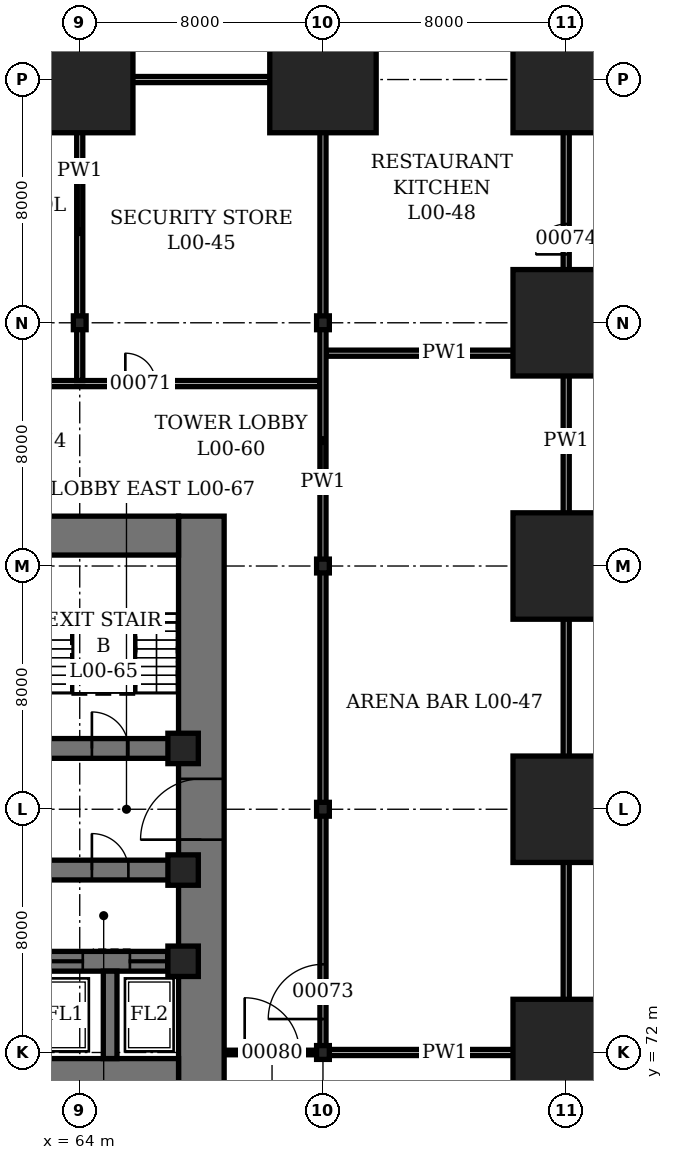
"""IFC4 building model, lengths in metres.
Left out: names, types, materials, properties, quantities, classifications, styles, units other than length and angle.
Written with IfcOpenShell. Run it as: python <this file> out.ifc"""

import sys

from ifc_helpers import new_model, si_unit, direction, frame, frame_2d, origin, origin_2d, place, context, subcontext, project, spatial, rectangle, hollow_rectangle, i_section, extrude, element, fill, save


model = new_model("IFC4")
c1 = context("Model", 3, precision=1e-05, world=origin(), true_north=direction((0.0, 1.0)))
c2 = subcontext(c1, "Body", "Model", "MODEL_VIEW")
j1 = project(units=[si_unit("LENGTHUNIT", "METRE"), si_unit("PLANEANGLEUNIT", "RADIAN")], contexts=[c1])
p1 = place(None, origin())
s1 = spatial("IfcSite", under=j1, at=p1, CompositionType="ELEMENT")
p2 = place(p1, origin())
s2 = spatial("IfcBuilding", under=s1, at=p2, CompositionType="ELEMENT")
p3 = place(p2, origin())
s3 = spatial("IfcBuildingStorey", under=s2, at=p3, CompositionType="ELEMENT", Elevation=0.0)
p4 = place(p3, frame((64.0, 96.0, 0.0), z_axis=(0.0, 0.0, 1.0), x_axis=(1.0, 0.0, 0.0)))
e1 = element("IfcColumn", 1, at=p4, inside=s3, PredefinedType="COLUMN", context=c2, shape_type="SweptSolid", body=[
    extrude(i_section(OverallWidth=0.419, OverallDepth=0.455, WebThickness=0.042, FlangeThickness=0.068, at=origin_2d()), origin(), (0.0, 0.0, 1.0), 4.9),
])
p5 = place(p3, frame((64.0, 104.0, 0.0), z_axis=(0.0, 0.0, 1.0), x_axis=(1.0, 0.0, 0.0)))
e2 = element("IfcColumn", 2, at=p5, inside=s3, PredefinedType="COLUMN", context=c2, shape_type="SweptSolid", body=[
    extrude(hollow_rectangle(XDim=3.5, YDim=3.5, WallThickness=0.5, at=origin_2d()), origin(), (0.0, 0.0, 1.0), 4.9),
])
for number, where, z_axis, x_axis in (
    (3, (72.0, 72.0, 0.0), (0.0, 0.0, 1.0), (1.0, 0.0, 0.0)),
    (4, (72.0, 80.0, 0.0), (0.0, 0.0, 1.0), (1.0, 0.0, 0.0)),
    (5, (72.0, 88.0, 0.0), (0.0, 0.0, 1.0), (1.0, 0.0, 0.0)),
    (6, (72.0, 96.0, 0.0), (0.0, 0.0, 1.0), (1.0, 0.0, 0.0)),
):
    element("IfcColumn", number, at=place(p3, frame(where, z_axis=z_axis, x_axis=x_axis)), inside=s3, PredefinedType="COLUMN", context=c2, shape_type="SweptSolid", body=[
        extrude(i_section(OverallWidth=0.419, OverallDepth=0.455, WebThickness=0.042, FlangeThickness=0.068, at=origin_2d()), origin(), (0.0, 0.0, 1.0), 4.9),
    ])
for number, where, z_axis, x_axis in (
    (7, (72.0, 104.0, 0.0), (0.0, 0.0, 1.0), (1.0, 0.0, 0.0)),
    (8, (80.0, 72.0, 0.0), (0.0, 0.0, 1.0), (1.0, 0.0, 0.0)),
    (9, (80.0, 80.0, 0.0), (0.0, 0.0, 1.0), (1.0, 0.0, 0.0)),
    (10, (80.0, 88.0, 0.0), (0.0, 0.0, 1.0), (1.0, 0.0, 0.0)),
    (11, (80.0, 96.0, 0.0), (0.0, 0.0, 1.0), (1.0, 0.0, 0.0)),
    (12, (80.0, 104.0, 0.0), (0.0, 0.0, 1.0), (1.0, 0.0, 0.0)),
):
    element("IfcColumn", number, at=place(p3, frame(where, z_axis=z_axis, x_axis=x_axis)), inside=s3, PredefinedType="COLUMN", context=c2, shape_type="SweptSolid", body=[
        extrude(hollow_rectangle(XDim=3.5, YDim=3.5, WallThickness=0.5, at=origin_2d()), origin(), (0.0, 0.0, 1.0), 4.9),
    ])
p6 = place(p3, frame((68.0, 70.2, -2.0), z_axis=(0.0, 0.0, 1.0), x_axis=(0.0, 1.0, 0.0)))
e13 = element("IfcWall", 13, at=p6, inside=s3, PredefinedType="SHEAR", context=c2, shape_type="SweptSolid", body=[
    extrude(rectangle(XDim=19.44, YDim=1.5, at=frame_2d((9.72, 0.0))), origin(), (0.0, 0.0, 1.0), 6.9),
])
p7 = place(p6, frame((8.8, 0.0, 2.0)))
e14 = element("IfcOpeningElement", 14, at=p7, cuts=e13, PredefinedType="OPENING", context=c2, shape_type="SweptSolid", body=[
    extrude(rectangle(XDim=2.0, YDim=2.4, at=frame_2d((1.0, 1.2))), frame((0.0, 0.76, 0.0), z_axis=(0.0, -1.0, 0.0), x_axis=(1.0, 0.0, 0.0)), (0.0, 0.0, 1.0), 1.52),
])
p8 = place(p3, frame((44.64, 71.0, -2.0), z_axis=(0.0, 0.0, 1.0), x_axis=(1.0, 0.0, 0.0)))
e15 = element("IfcWall", 15, at=p8, inside=s3, PredefinedType="SHEAR", context=c2, shape_type="SweptSolid", body=[
    extrude(rectangle(XDim=22.61, YDim=1.6, at=frame_2d((11.305, 0.0))), origin(), (0.0, 0.0, 1.0), 6.9),
])
p9 = place(p8, frame((6.31, 0.0, 2.0)))
e16 = element("IfcOpeningElement", 16, at=p9, cuts=e15, PredefinedType="OPENING", context=c2, shape_type="SweptSolid", body=[
    extrude(rectangle(XDim=1.1, YDim=2.2, at=frame_2d((0.55, 1.1))), frame((0.0, 0.81, 0.0), z_axis=(0.0, -1.0, 0.0), x_axis=(1.0, 0.0, 0.0)), (0.0, 0.0, 1.0), 1.62),
])
p10 = place(p8, frame((9.31, 0.0, 2.0)))
e17 = element("IfcOpeningElement", 17, at=p10, cuts=e15, PredefinedType="OPENING", context=c2, shape_type="SweptSolid", body=[
    extrude(rectangle(XDim=1.1, YDim=2.2, at=frame_2d((0.55, 1.1))), frame((0.0, 0.81, 0.0), z_axis=(0.0, -1.0, 0.0), x_axis=(1.0, 0.0, 0.0)), (0.0, 0.0, 1.0), 1.62),
])
p11 = place(p8, frame((12.31, 0.0, 2.0)))
e18 = element("IfcOpeningElement", 18, at=p11, cuts=e15, PredefinedType="OPENING", context=c2, shape_type="SweptSolid", body=[
    extrude(rectangle(XDim=1.1, YDim=2.2, at=frame_2d((0.55, 1.1))), frame((0.0, 0.81, 0.0), z_axis=(0.0, -1.0, 0.0), x_axis=(1.0, 0.0, 0.0)), (0.0, 0.0, 1.0), 1.62),
])
p12 = place(p8, frame((15.31, 0.0, 2.0)))
e19 = element("IfcOpeningElement", 19, at=p12, cuts=e15, PredefinedType="OPENING", context=c2, shape_type="SweptSolid", body=[
    extrude(rectangle(XDim=1.1, YDim=2.2, at=frame_2d((0.55, 1.1))), frame((0.0, 0.81, 0.0), z_axis=(0.0, -1.0, 0.0), x_axis=(1.0, 0.0, 0.0)), (0.0, 0.0, 1.0), 1.62),
])
p13 = place(p3, frame((44.64, 89.0, -2.0), z_axis=(0.0, 0.0, 1.0), x_axis=(1.0, 0.0, 0.0)))
e20 = element("IfcWall", 20, at=p13, inside=s3, PredefinedType="SHEAR", context=c2, shape_type="SweptSolid", body=[
    extrude(rectangle(XDim=22.61, YDim=1.28, at=frame_2d((11.305, 0.0))), origin(), (0.0, 0.0, 1.0), 6.9),
])
p14 = place(p13, frame((7.86, 0.0, 2.0)))
e21 = element("IfcOpeningElement", 21, at=p14, cuts=e20, PredefinedType="OPENING", context=c2, shape_type="SweptSolid", body=[
    extrude(rectangle(XDim=1.0, YDim=2.1, at=frame_2d((0.5, 1.05))), frame((0.0, 0.65, 0.0), z_axis=(0.0, -1.0, 0.0), x_axis=(1.0, 0.0, 0.0)), (0.0, 0.0, 1.0), 1.3),
])
p15 = place(p13, frame((13.91, 0.0, 2.0)))
e22 = element("IfcOpeningElement", 22, at=p15, cuts=e20, PredefinedType="OPENING", context=c2, shape_type="SweptSolid", body=[
    extrude(rectangle(XDim=0.9, YDim=2.1, at=frame_2d((0.45, 1.05))), frame((0.0, 0.65, 0.0), z_axis=(0.0, -1.0, 0.0), x_axis=(1.0, 0.0, 0.0)), (0.0, 0.0, 1.0), 1.3),
])
p16 = place(p3, frame((62.325, 75.0, -2.0), z_axis=(0.0, 0.0, 1.0), x_axis=(1.0, 0.0, 0.0)))
e23 = element("IfcWall", 23, at=p16, inside=s3, PredefinedType="SHEAR", context=c2, shape_type="SweptSolid", body=[
    extrude(rectangle(XDim=4.925, YDim=0.65, at=frame_2d((2.462, 0.0))), origin(), (0.0, 0.0, 1.0), 6.9),
])
p17 = place(p16, frame((0.575, 0.0, 2.0)))
e24 = element("IfcOpeningElement", 24, at=p17, cuts=e23, PredefinedType="OPENING", context=c2, shape_type="SweptSolid", body=[
    extrude(rectangle(XDim=1.2, YDim=2.2, at=frame_2d((0.6, 1.1))), frame((0.0, 0.335, 0.0), z_axis=(0.0, -1.0, 0.0), x_axis=(1.0, 0.0, 0.0)), (0.0, 0.0, 1.0), 0.67),
])
p18 = place(p16, frame((3.325, 0.0, 2.0)))
e25 = element("IfcOpeningElement", 25, at=p18, cuts=e23, PredefinedType="OPENING", context=c2, shape_type="SweptSolid", body=[
    extrude(rectangle(XDim=1.2, YDim=2.2, at=frame_2d((0.6, 1.1))), frame((0.0, 0.335, 0.0), z_axis=(0.0, -1.0, 0.0), x_axis=(1.0, 0.0, 0.0)), (0.0, 0.0, 1.0), 0.67),
])
p19 = place(p3, frame((62.325, 78.0, -2.0), z_axis=(0.0, 0.0, 1.0), x_axis=(1.0, 0.0, 0.0)))
e26 = element("IfcWall", 26, at=p19, inside=s3, PredefinedType="SHEAR", context=c2, shape_type="SweptSolid", body=[
    extrude(rectangle(XDim=4.925, YDim=0.65, at=frame_2d((2.462, 0.0))), origin(), (0.0, 0.0, 1.0), 6.9),
])
p20 = place(p19, frame((2.075, 0.0, 2.0)))
e27 = element("IfcOpeningElement", 27, at=p20, cuts=e26, PredefinedType="OPENING", context=c2, shape_type="SweptSolid", body=[
    extrude(rectangle(XDim=1.2, YDim=2.1, at=frame_2d((0.6, 1.05))), frame((0.0, 0.335, 0.0), z_axis=(0.0, -1.0, 0.0), x_axis=(1.0, 0.0, 0.0)), (0.0, 0.0, 1.0), 0.67),
])
p21 = place(p3, frame((62.325, 82.0, -2.0), z_axis=(0.0, 0.0, 1.0), x_axis=(1.0, 0.0, 0.0)))
e28 = element("IfcWall", 28, at=p21, inside=s3, PredefinedType="SHEAR", context=c2, shape_type="SweptSolid", body=[
    extrude(rectangle(XDim=4.925, YDim=0.65, at=frame_2d((2.462, 0.0))), origin(), (0.0, 0.0, 1.0), 6.9),
])
p22 = place(p21, frame((2.075, 0.0, 2.0)))
e29 = element("IfcOpeningElement", 29, at=p22, cuts=e28, PredefinedType="OPENING", context=c2, shape_type="SweptSolid", body=[
    extrude(rectangle(XDim=1.2, YDim=2.1, at=frame_2d((0.6, 1.05))), frame((0.0, 0.335, 0.0), z_axis=(0.0, -1.0, 0.0), x_axis=(1.0, 0.0, 0.0)), (0.0, 0.0, 1.0), 0.67),
])
p23 = place(p3, frame((65.0, 71.8, -2.0), z_axis=(0.0, 0.0, 1.0), x_axis=(0.0, 1.0, 0.0)))
e30 = element("IfcWall", 30, at=p23, inside=s3, PredefinedType="SHEAR", context=c2, shape_type="SweptSolid", body=[
    extrude(rectangle(XDim=2.875, YDim=0.45, at=frame_2d((1.438, 0.0))), origin(), (0.0, 0.0, 1.0), 6.9),
])
for number, where, z_axis, x_axis in (
    (31, (67.4, 75.0, -2.0), (0.0, 0.0, 1.0), (1.0, 0.0, 0.0)),
    (32, (67.4, 78.0, -2.0), (0.0, 0.0, 1.0), (1.0, 0.0, 0.0)),
    (33, (67.4, 82.0, -2.0), (0.0, 0.0, 1.0), (1.0, 0.0, 0.0)),
):
    element("IfcColumn", number, at=place(p3, frame(where, z_axis=z_axis, x_axis=x_axis)), inside=s3, PredefinedType="COLUMN", context=c2, shape_type="SweptSolid", body=[
        extrude(hollow_rectangle(XDim=1.0, YDim=1.0, WallThickness=0.15, at=origin_2d()), origin(), (0.0, 0.0, 1.0), 6.9),
    ])
p24 = place(p3, frame((72.1, 72.0, 0.0), z_axis=(0.0, 0.0, 1.0), x_axis=(1.0, 0.0, 0.0)))
e34 = element("IfcWall", 34, at=p24, inside=s3, PredefinedType="PARTITIONING", context=c2, shape_type="SweptSolid", body=[
    extrude(rectangle(XDim=7.8, YDim=0.2, at=frame_2d((3.9, 0.0))), origin(), (0.0, 0.0, 1.0), 3.928),
])
p25 = place(p3, frame((40.1, 94.0, 0.0), z_axis=(0.0, 0.0, 1.0), x_axis=(1.0, 0.0, 0.0)))
e35 = element("IfcWall", 35, at=p25, inside=s3, PredefinedType="PARTITIONING", context=c2, shape_type="SweptSolid", body=[
    extrude(rectangle(XDim=31.8, YDim=0.2, at=frame_2d((15.9, 0.0))), origin(), (0.0, 0.0, 1.0), 4.7),
])
p26 = place(p25, frame((1.0, 0.0, 0.0)))
e36 = element("IfcOpeningElement", 36, at=p26, cuts=e35, PredefinedType="OPENING", context=c2, shape_type="SweptSolid", body=[
    extrude(rectangle(XDim=1.8, YDim=2.4, at=frame_2d((0.9, 1.2))), frame((0.0, 0.11, 0.0), z_axis=(0.0, -1.0, 0.0), x_axis=(1.0, 0.0, 0.0)), (0.0, 0.0, 1.0), 0.22),
])
p27 = place(p25, frame((17.4, 0.0, 0.0)))
e37 = element("IfcOpeningElement", 37, at=p27, cuts=e35, PredefinedType="OPENING", context=c2, shape_type="SweptSolid", body=[
    extrude(rectangle(XDim=1.0, YDim=2.1, at=frame_2d((0.5, 1.05))), frame((0.0, 0.11, 0.0), z_axis=(0.0, -1.0, 0.0), x_axis=(1.0, 0.0, 0.0)), (0.0, 0.0, 1.0), 0.22),
])
p28 = place(p25, frame((25.4, 0.0, 0.0)))
e38 = element("IfcOpeningElement", 38, at=p28, cuts=e35, PredefinedType="OPENING", context=c2, shape_type="SweptSolid", body=[
    extrude(rectangle(XDim=1.0, YDim=2.1, at=frame_2d((0.5, 1.05))), frame((0.0, 0.11, 0.0), z_axis=(0.0, -1.0, 0.0), x_axis=(1.0, 0.0, 0.0)), (0.0, 0.0, 1.0), 0.22),
])
p29 = place(p3, frame((72.1, 95.0, 0.0), z_axis=(0.0, 0.0, 1.0), x_axis=(1.0, 0.0, 0.0)))
e39 = element("IfcWall", 39, at=p29, inside=s3, PredefinedType="PARTITIONING", context=c2, shape_type="SweptSolid", body=[
    extrude(rectangle(XDim=7.8, YDim=0.2, at=frame_2d((3.9, 0.0))), origin(), (0.0, 0.0, 1.0), 4.7),
])
p30 = place(p3, frame((24.1, 104.0, 0.0), z_axis=(0.0, 0.0, 1.0), x_axis=(1.0, 0.0, 0.0)))
e40 = element("IfcWall", 40, at=p30, inside=s3, PredefinedType="PARTITIONING", context=c2, shape_type="SweptSolid", body=[
    extrude(rectangle(XDim=47.8, YDim=0.2, at=frame_2d((23.9, 0.0))), origin(), (0.0, 0.0, 1.0), 3.928),
])
p31 = place(p30, frame((18.0, 0.0, 0.0)))
e41 = element("IfcOpeningElement", 41, at=p31, cuts=e40, PredefinedType="OPENING", context=c2, shape_type="SweptSolid", body=[
    extrude(rectangle(XDim=1.8, YDim=2.4, at=frame_2d((0.9, 1.2))), frame((0.0, 0.11, 0.0), z_axis=(0.0, -1.0, 0.0), x_axis=(1.0, 0.0, 0.0)), (0.0, 0.0, 1.0), 0.22),
])
p32 = place(p30, frame((34.15, 0.0, 0.0)))
e42 = element("IfcOpeningElement", 42, at=p32, cuts=e40, PredefinedType="OPENING", context=c2, shape_type="SweptSolid", body=[
    extrude(rectangle(XDim=1.0, YDim=2.1, at=frame_2d((0.5, 1.05))), frame((0.0, 0.11, 0.0), z_axis=(0.0, -1.0, 0.0), x_axis=(1.0, 0.0, 0.0)), (0.0, 0.0, 1.0), 0.22),
])
p33 = place(p3, frame((80.1, 104.0, 0.0), z_axis=(0.0, 0.0, 1.0), x_axis=(1.0, 0.0, 0.0)))
e43 = element("IfcWall", 43, at=p33, inside=s3, PredefinedType="PARTITIONING", context=c2, shape_type="SweptSolid", body=[
    extrude(rectangle(XDim=7.8, YDim=0.2, at=frame_2d((3.9, 0.0))), origin(), (0.0, 0.0, 1.0), 3.928),
])
p34 = place(p33, frame((3.4, 0.0, 0.0)))
e44 = element("IfcOpeningElement", 44, at=p34, cuts=e43, PredefinedType="OPENING", context=c2, shape_type="SweptSolid", body=[
    extrude(rectangle(XDim=1.0, YDim=2.1, at=frame_2d((0.5, 1.05))), frame((0.0, 0.11, 0.0), z_axis=(0.0, -1.0, 0.0), x_axis=(1.0, 0.0, 0.0)), (0.0, 0.0, 1.0), 0.22),
])
p35 = place(p3, frame((64.0, 94.1, 0.0), z_axis=(0.0, 0.0, 1.0), x_axis=(0.0, 1.0, 0.0)))
e45 = element("IfcWall", 45, at=p35, inside=s3, PredefinedType="PARTITIONING", context=c2, shape_type="SweptSolid", body=[
    extrude(rectangle(XDim=9.8, YDim=0.2, at=frame_2d((4.9, 0.0))), origin(), (0.0, 0.0, 1.0), 3.928),
])
p36 = place(p3, frame((72.0, 72.1, 0.0), z_axis=(0.0, 0.0, 1.0), x_axis=(0.0, 1.0, 0.0)))
e46 = element("IfcWall", 46, at=p36, inside=s3, PredefinedType="PARTITIONING", context=c2, shape_type="SweptSolid", body=[
    extrude(rectangle(XDim=40.05, YDim=0.2, at=frame_2d((20.025, 0.0))), origin(), (0.0, 0.0, 1.0), 3.928),
])
p37 = place(p36, frame((1.0, 0.0, 0.0)))
e47 = element("IfcOpeningElement", 47, at=p37, cuts=e46, PredefinedType="OPENING", context=c2, shape_type="SweptSolid", body=[
    extrude(rectangle(XDim=1.8, YDim=2.4, at=frame_2d((0.9, 1.2))), frame((0.0, 0.11, 0.0), z_axis=(0.0, -1.0, 0.0), x_axis=(1.0, 0.0, 0.0)), (0.0, 0.0, 1.0), 0.22),
])
p38 = place(p3, frame((80.0, 72.1, 0.0), z_axis=(0.0, 0.0, 1.0), x_axis=(0.0, 1.0, 0.0)))
e48 = element("IfcWall", 48, at=p38, inside=s3, PredefinedType="PARTITIONING", context=c2, shape_type="SweptSolid", body=[
    extrude(rectangle(XDim=40.05, YDim=0.2, at=frame_2d((20.025, 0.0))), origin(), (0.0, 0.0, 1.0), 3.928),
])
p39 = place(p38, frame((26.15, 0.0, 0.0)))
e49 = element("IfcOpeningElement", 49, at=p39, cuts=e48, PredefinedType="OPENING", context=c2, shape_type="SweptSolid", body=[
    extrude(rectangle(XDim=1.0, YDim=2.1, at=frame_2d((0.5, 1.05))), frame((0.0, 0.11, 0.0), z_axis=(0.0, -1.0, 0.0), x_axis=(1.0, 0.0, 0.0)), (0.0, 0.0, 1.0), 0.22),
])
p40 = place(p3, frame((68.75, 72.0, 0.0), z_axis=(0.0, 0.0, 1.0), x_axis=(1.0, 0.0, 0.0)))
e50 = element("IfcWall", 50, at=p40, inside=s3, PredefinedType="PARTITIONING", context=c2, shape_type="SweptSolid", body=[
    extrude(rectangle(XDim=3.15, YDim=0.15, at=frame_2d((1.575, 0.0))), origin(), (0.0, 0.0, 1.0), 4.7),
])
p41 = place(p40, frame((0.675, 0.0, 0.0)))
e51 = element("IfcOpeningElement", 51, at=p41, cuts=e50, PredefinedType="OPENING", context=c2, shape_type="SweptSolid", body=[
    extrude(rectangle(XDim=1.8, YDim=2.4, at=frame_2d((0.9, 1.2))), frame((0.0, 0.085, 0.0), z_axis=(0.0, -1.0, 0.0), x_axis=(1.0, 0.0, 0.0)), (0.0, 0.0, 1.0), 0.17),
])
p42 = place(p22, origin())
e52 = element("IfcDoor", 52, at=p42, inside=s3, OperationType="SINGLE_SWING_LEFT", PredefinedType="DOOR", context=c2, shape_type="SweptSolid", body=[
    extrude(rectangle(XDim=1.2, YDim=2.1, at=frame_2d((0.6, 1.05))), frame((0.0, 0.325, 0.0), z_axis=(0.0, -1.0, 0.0), x_axis=(1.0, 0.0, 0.0)), (0.0, 0.0, 1.0), 0.649),
])
fill(e29, e52)
p43 = place(p7, origin())
e53 = element("IfcDoor", 53, at=p43, inside=s3, OperationType="DOUBLE_DOOR_SINGLE_SWING", PredefinedType="DOOR", context=c2, shape_type="SweptSolid", body=[
    extrude(rectangle(XDim=2.0, YDim=2.4, at=frame_2d((1.0, 1.2))), frame((0.0, -0.05, 0.0), z_axis=(0.0, -1.0, 0.0), x_axis=(1.0, 0.0, 0.0)), (0.0, 0.0, 1.0), 0.7),
])
fill(e14, e53)
p44 = place(p20, origin())
e54 = element("IfcDoor", 54, at=p44, inside=s3, OperationType="SINGLE_SWING_RIGHT", PredefinedType="DOOR", context=c2, shape_type="SweptSolid", body=[
    extrude(rectangle(XDim=1.2, YDim=2.1, at=frame_2d((0.6, 1.05))), frame((0.0, 0.325, 0.0), z_axis=(0.0, -1.0, 0.0), x_axis=(1.0, 0.0, 0.0)), (0.0, 0.0, 1.0), 0.649),
])
fill(e27, e54)
p45 = place(p17, origin())
e55 = element("IfcDoor", 55, at=p45, inside=s3, OperationType="SLIDING_TO_LEFT", PredefinedType="DOOR", context=c2, shape_type="SweptSolid", body=[
    extrude(rectangle(XDim=1.2, YDim=2.2, at=frame_2d((0.6, 1.1))), frame((0.0, 0.325, 0.0), z_axis=(0.0, -1.0, 0.0), x_axis=(1.0, 0.0, 0.0)), (0.0, 0.0, 1.0), 0.649),
])
fill(e24, e55)
p46 = place(p18, origin())
e56 = element("IfcDoor", 56, at=p46, inside=s3, OperationType="SLIDING_TO_LEFT", PredefinedType="DOOR", context=c2, shape_type="SweptSolid", body=[
    extrude(rectangle(XDim=1.2, YDim=2.2, at=frame_2d((0.6, 1.1))), frame((0.0, 0.325, 0.0), z_axis=(0.0, -1.0, 0.0), x_axis=(1.0, 0.0, 0.0)), (0.0, 0.0, 1.0), 0.649),
])
fill(e25, e56)
p47 = place(p28, origin())
e57 = element("IfcDoor", 57, at=p47, inside=s3, OperationType="SINGLE_SWING_LEFT", PredefinedType="DOOR", context=c2, shape_type="SweptSolid", body=[
    extrude(rectangle(XDim=1.0, YDim=2.1, at=frame_2d((0.5, 1.05))), frame((0.0, 0.1, 0.0), z_axis=(0.0, -1.0, 0.0), x_axis=(1.0, 0.0, 0.0)), (0.0, 0.0, 1.0), 0.199),
])
fill(e38, e57)
p48 = place(p37, origin())
e58 = element("IfcDoor", 58, at=p48, inside=s3, OperationType="DOUBLE_DOOR_DOUBLE_SWING", PredefinedType="DOOR", context=c2, shape_type="SweptSolid", body=[
    extrude(rectangle(XDim=1.8, YDim=2.4, at=frame_2d((0.9, 1.2))), frame((0.0, 0.1, 0.0), z_axis=(0.0, -1.0, 0.0), x_axis=(1.0, 0.0, 0.0)), (0.0, 0.0, 1.0), 0.199),
])
fill(e47, e58)
p49 = place(p39, origin())
e59 = element("IfcDoor", 59, at=p49, inside=s3, OperationType="SINGLE_SWING_LEFT", PredefinedType="DOOR", context=c2, shape_type="SweptSolid", body=[
    extrude(rectangle(XDim=1.0, YDim=2.1, at=frame_2d((0.5, 1.05))), frame((0.0, 0.1, 0.0), z_axis=(0.0, -1.0, 0.0), x_axis=(1.0, 0.0, 0.0)), (0.0, 0.0, 1.0), 0.199),
])
fill(e49, e59)
p50 = place(p41, origin())
e60 = element("IfcDoor", 60, at=p50, inside=s3, OperationType="DOUBLE_DOOR_DOUBLE_SWING", PredefinedType="DOOR", context=c2, shape_type="SweptSolid", body=[
    extrude(rectangle(XDim=1.8, YDim=2.4, at=frame_2d((0.9, 1.2))), frame((0.0, 0.075, 0.0), z_axis=(0.0, -1.0, 0.0), x_axis=(1.0, 0.0, 0.0)), (0.0, 0.0, 1.0), 0.149),
])
fill(e51, e60)
save(model, sys.argv[1])
